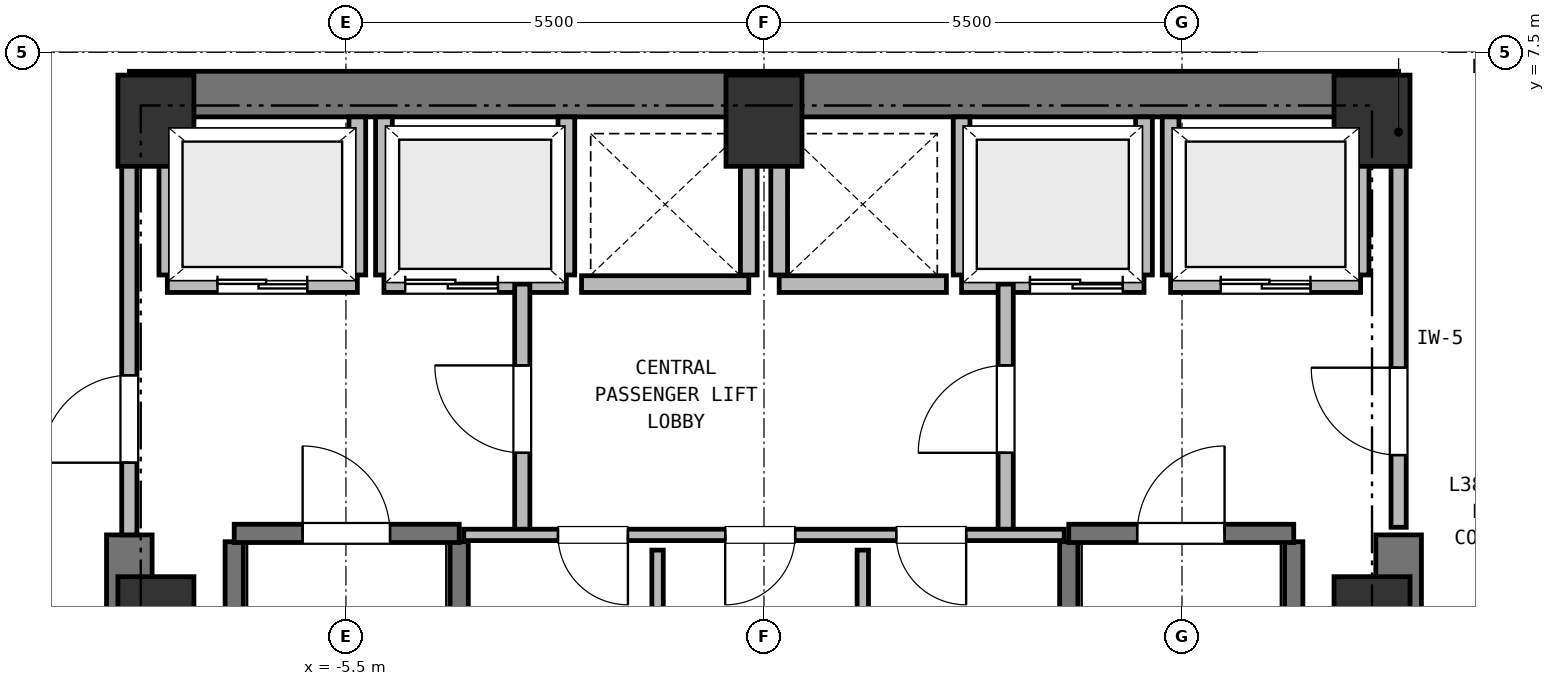
"""IFC4 building model, lengths in metres.
Left out: names, types, materials, properties, quantities, classifications, styles, units other than length and angle.
Written with IfcOpenShell. Run it as: python <this file> out.ifc"""

import sys

from ifc_helpers import new_model, si_unit, direction, frame, frame_2d, origin, origin_2d, place, context, subcontext, project, spatial, rectangle, extrude, element, fill, save


model = new_model("IFC4")
c1 = context("Model", 3, precision=1e-05, world=origin(), true_north=direction((0.0, 1.0)))
c2 = subcontext(c1, "Body", "Model", "MODEL_VIEW")
j1 = project(units=[si_unit("LENGTHUNIT", "METRE"), si_unit("PLANEANGLEUNIT", "RADIAN")], contexts=[c1])
p1 = place(None, origin())
s1 = spatial("IfcSite", under=j1, at=p1, CompositionType="ELEMENT")
p2 = place(p1, origin())
s2 = spatial("IfcBuilding", under=s1, at=p2, CompositionType="ELEMENT")
p3 = place(p2, frame((0.0, 0.0, 153.5)))
s3 = spatial("IfcBuildingStorey", under=s2, at=p3, CompositionType="ELEMENT", Elevation=153.5)
for number, where, z_axis, x_axis in (
    (1, (8.0, 0.0, 0.0), (0.0, 0.0, 1.0), (1.0, 0.0, 0.0)),
    (2, (8.0, 6.6, 0.0), (0.0, 0.0, 1.0), (1.0, 0.0, 0.0)),
    (3, (0.0, 6.6, 0.0), (0.0, 0.0, 1.0), (1.0, 0.0, 0.0)),
    (4, (-8.0, 6.6, 0.0), (0.0, 0.0, 1.0), (1.0, 0.0, 0.0)),
    (5, (-8.0, 0.0, 0.0), (0.0, 0.0, 1.0), (1.0, 0.0, 0.0)),
):
    element("IfcColumn", number, at=place(p3, frame(where, z_axis=z_axis, x_axis=x_axis)), inside=s3, PredefinedType="COLUMN", context=c2, shape_type="SweptSolid", body=[
        extrude(rectangle(XDim=1.0, YDim=1.2, at=origin_2d()), origin(), (0.0, 0.0, 1.0), 3.75),
    ])
p4 = place(p3, frame((-8.35, 6.95, 0.0), z_axis=(0.0, 0.0, 1.0), x_axis=(1.0, 0.0, 0.0)))
e6 = element("IfcWall", 6, at=p4, inside=s3, PredefinedType="SHEAR", context=c2, shape_type="SweptSolid", body=[
    extrude(rectangle(XDim=16.7, YDim=0.6, at=frame_2d((8.35, 0.0))), origin(), (0.0, 0.0, 1.0), 3.5),
])
for number, where, z_axis, x_axis in (
    (7, (-8.35, -6.95, 0.0), (0.0, 0.0, 1.0), (0.0, 1.0, 0.0)),
    (8, (8.35, -6.95, 0.0), (0.0, 0.0, 1.0), (0.0, 1.0, 0.0)),
):
    element("IfcWall", number, at=place(p3, frame(where, z_axis=z_axis, x_axis=x_axis)), inside=s3, PredefinedType="SHEAR", context=c2, shape_type="SweptSolid", body=[
        extrude(rectangle(XDim=8.1, YDim=0.6, at=frame_2d((4.05, 0.0))), origin(), (0.0, 0.0, 1.0), 3.5),
    ])
for number, where, z_axis, x_axis in (
    (9, (-6.97, -6.16, 0.0), (0.0, 0.0, 1.0), (0.0, 1.0, 0.0)),
    (10, (-4.01, -6.16, 0.0), (0.0, 0.0, 1.0), (0.0, 1.0, 0.0)),
):
    element("IfcWall", number, at=place(p3, frame(where, z_axis=z_axis, x_axis=x_axis)), inside=s3, PredefinedType="SHEAR", context=c2, shape_type="SweptSolid", body=[
        extrude(rectangle(XDim=7.22, YDim=0.24, at=frame_2d((3.61, 0.0))), origin(), (0.0, 0.0, 1.0), 3.5),
    ])
p5 = place(p3, frame((-6.97, 1.17, 0.0), z_axis=(0.0, 0.0, 1.0), x_axis=(1.0, 0.0, 0.0)))
e11 = element("IfcWall", 11, at=p5, inside=s3, PredefinedType="SHEAR", context=c2, shape_type="SweptSolid", body=[
    extrude(rectangle(XDim=2.96, YDim=0.24, at=frame_2d((1.48, 0.0))), origin(), (0.0, 0.0, 1.0), 3.5),
])
p6 = place(p5, frame((0.9, 0.0, 0.0)))
e12 = element("IfcOpeningElement", 12, at=p6, cuts=e11, PredefinedType="OPENING", context=c2, shape_type="SweptSolid", body=[
    extrude(rectangle(XDim=1.15, YDim=2.15, at=frame_2d((0.575, 1.075))), frame((0.0, 0.13, 0.0), z_axis=(0.0, -1.0, 0.0), x_axis=(1.0, 0.0, 0.0)), (0.0, 0.0, 1.0), 0.26),
])
for number, where, z_axis, x_axis in (
    (13, (4.01, -6.16, 0.0), (0.0, 0.0, 1.0), (0.0, 1.0, 0.0)),
    (14, (6.97, -6.16, 0.0), (0.0, 0.0, 1.0), (0.0, 1.0, 0.0)),
):
    element("IfcWall", number, at=place(p3, frame(where, z_axis=z_axis, x_axis=x_axis)), inside=s3, PredefinedType="SHEAR", context=c2, shape_type="SweptSolid", body=[
        extrude(rectangle(XDim=7.22, YDim=0.24, at=frame_2d((3.61, 0.0))), origin(), (0.0, 0.0, 1.0), 3.5),
    ])
p7 = place(p3, frame((4.01, 1.17, 0.0), z_axis=(0.0, 0.0, 1.0), x_axis=(1.0, 0.0, 0.0)))
e15 = element("IfcWall", 15, at=p7, inside=s3, PredefinedType="SHEAR", context=c2, shape_type="SweptSolid", body=[
    extrude(rectangle(XDim=2.96, YDim=0.24, at=frame_2d((1.48, 0.0))), origin(), (0.0, 0.0, 1.0), 3.5),
])
p8 = place(p7, frame((0.9, 0.0, 0.0)))
e16 = element("IfcOpeningElement", 16, at=p8, cuts=e15, PredefinedType="OPENING", context=c2, shape_type="SweptSolid", body=[
    extrude(rectangle(XDim=1.15, YDim=2.15, at=frame_2d((0.575, 1.075))), frame((0.0, 0.13, 0.0), z_axis=(0.0, -1.0, 0.0), x_axis=(1.0, 0.0, 0.0)), (0.0, 0.0, 1.0), 0.26),
])
p9 = place(p3, frame((-7.85, 4.45, 0.0), z_axis=(0.0, 0.0, 1.0), x_axis=(1.0, 0.0, 0.0)))
e17 = element("IfcWall", 17, at=p9, inside=s3, PredefinedType="PARTITIONING", context=c2, shape_type="SweptSolid", body=[
    extrude(rectangle(XDim=2.5, YDim=0.22, at=frame_2d((1.25, 0.0))), origin(), (0.0, 0.0, 1.0), 3.5),
])
p10 = place(p9, frame((0.66, 0.0, 0.0)))
e18 = element("IfcOpeningElement", 18, at=p10, cuts=e17, PredefinedType="OPENING", context=c2, shape_type="SweptSolid", body=[
    extrude(rectangle(XDim=1.18, YDim=2.15, at=frame_2d((0.59, 1.075))), frame((0.0, 0.12, 0.0), z_axis=(0.0, -1.0, 0.0), x_axis=(1.0, 0.0, 0.0)), (0.0, 0.0, 1.0), 0.24),
])
p11 = place(p3, frame((-7.85, 4.57, 0.0), z_axis=(0.0, 0.0, 1.0), x_axis=(0.0, 1.0, 0.0)))
e19 = element("IfcWall", 19, at=p11, inside=s3, PredefinedType="PARTITIONING", context=c2, shape_type="SweptSolid", body=[
    extrude(rectangle(XDim=2.08, YDim=0.22, at=frame_2d((1.04, 0.0))), origin(), (0.0, 0.0, 1.0), 3.12),
])
p12 = place(p3, frame((-5.35, 4.57, 0.0), z_axis=(0.0, 0.0, 1.0), x_axis=(0.0, 1.0, 0.0)))
e20 = element("IfcWall", 20, at=p12, inside=s3, PredefinedType="PARTITIONING", context=c2, shape_type="SweptSolid", body=[
    extrude(rectangle(XDim=2.08, YDim=0.22, at=frame_2d((1.04, 0.0))), origin(), (0.0, 0.0, 1.0), 3.5),
])
p13 = place(p3, frame((5.35, 4.45, 0.0), z_axis=(0.0, 0.0, 1.0), x_axis=(1.0, 0.0, 0.0)))
e21 = element("IfcWall", 21, at=p13, inside=s3, PredefinedType="PARTITIONING", context=c2, shape_type="SweptSolid", body=[
    extrude(rectangle(XDim=2.5, YDim=0.22, at=frame_2d((1.25, 0.0))), origin(), (0.0, 0.0, 1.0), 3.5),
])
p14 = place(p13, frame((0.66, 0.0, 0.0)))
e22 = element("IfcOpeningElement", 22, at=p14, cuts=e21, PredefinedType="OPENING", context=c2, shape_type="SweptSolid", body=[
    extrude(rectangle(XDim=1.18, YDim=2.15, at=frame_2d((0.59, 1.075))), frame((0.0, 0.12, 0.0), z_axis=(0.0, -1.0, 0.0), x_axis=(1.0, 0.0, 0.0)), (0.0, 0.0, 1.0), 0.24),
])
p15 = place(p3, frame((5.35, 4.57, 0.0), z_axis=(0.0, 0.0, 1.0), x_axis=(0.0, 1.0, 0.0)))
e23 = element("IfcWall", 23, at=p15, inside=s3, PredefinedType="PARTITIONING", context=c2, shape_type="SweptSolid", body=[
    extrude(rectangle(XDim=2.08, YDim=0.22, at=frame_2d((1.04, 0.0))), origin(), (0.0, 0.0, 1.0), 3.5),
])
p16 = place(p3, frame((7.85, 4.57, 0.0), z_axis=(0.0, 0.0, 1.0), x_axis=(0.0, 1.0, 0.0)))
e24 = element("IfcWall", 24, at=p16, inside=s3, PredefinedType="PARTITIONING", context=c2, shape_type="SweptSolid", body=[
    extrude(rectangle(XDim=2.08, YDim=0.22, at=frame_2d((1.04, 0.0))), origin(), (0.0, 0.0, 1.0), 3.12),
])
p17 = place(p3, frame((-5.0, 4.45, 0.0), z_axis=(0.0, 0.0, 1.0), x_axis=(1.0, 0.0, 0.0)))
e25 = element("IfcWall", 25, at=p17, inside=s3, PredefinedType="PARTITIONING", context=c2, shape_type="SweptSolid", body=[
    extrude(rectangle(XDim=2.4, YDim=0.22, at=frame_2d((1.2, 0.0))), origin(), (0.0, 0.0, 1.0), 3.5),
])
p18 = place(p17, frame((0.28, 0.0, 0.0)))
e26 = element("IfcOpeningElement", 26, at=p18, cuts=e25, PredefinedType="OPENING", context=c2, shape_type="SweptSolid", body=[
    extrude(rectangle(XDim=1.22, YDim=2.15, at=frame_2d((0.61, 1.075))), frame((0.0, 0.12, 0.0), z_axis=(0.0, -1.0, 0.0), x_axis=(1.0, 0.0, 0.0)), (0.0, 0.0, 1.0), 0.24),
])
for number, where, z_axis, x_axis in (
    (27, (-5.0, 4.57, 0.0), (0.0, 0.0, 1.0), (0.0, 1.0, 0.0)),
    (28, (-2.6, 4.57, 0.0), (0.0, 0.0, 1.0), (0.0, 1.0, 0.0)),
):
    element("IfcWall", number, at=place(p3, frame(where, z_axis=z_axis, x_axis=x_axis)), inside=s3, PredefinedType="PARTITIONING", context=c2, shape_type="SweptSolid", body=[
        extrude(rectangle(XDim=2.08, YDim=0.22, at=frame_2d((1.04, 0.0))), origin(), (0.0, 0.0, 1.0), 3.5),
    ])
p19 = place(p3, frame((2.6, 4.45, 0.0), z_axis=(0.0, 0.0, 1.0), x_axis=(1.0, 0.0, 0.0)))
e29 = element("IfcWall", 29, at=p19, inside=s3, PredefinedType="PARTITIONING", context=c2, shape_type="SweptSolid", body=[
    extrude(rectangle(XDim=2.4, YDim=0.22, at=frame_2d((1.2, 0.0))), origin(), (0.0, 0.0, 1.0), 3.5),
])
p20 = place(p19, frame((0.9, 0.0, 0.0)))
e30 = element("IfcOpeningElement", 30, at=p20, cuts=e29, PredefinedType="OPENING", context=c2, shape_type="SweptSolid", body=[
    extrude(rectangle(XDim=1.22, YDim=2.15, at=frame_2d((0.61, 1.075))), frame((0.0, 0.12, 0.0), z_axis=(0.0, -1.0, 0.0), x_axis=(1.0, 0.0, 0.0)), (0.0, 0.0, 1.0), 0.24),
])
for number, where, z_axis, x_axis in (
    (31, (2.6, 4.57, 0.0), (0.0, 0.0, 1.0), (0.0, 1.0, 0.0)),
    (32, (5.0, 4.57, 0.0), (0.0, 0.0, 1.0), (0.0, 1.0, 0.0)),
):
    element("IfcWall", number, at=place(p3, frame(where, z_axis=z_axis, x_axis=x_axis)), inside=s3, PredefinedType="PARTITIONING", context=c2, shape_type="SweptSolid", body=[
        extrude(rectangle(XDim=2.08, YDim=0.22, at=frame_2d((1.04, 0.0))), origin(), (0.0, 0.0, 1.0), 3.5),
    ])
p21 = place(p3, frame((-2.4, 4.45, 0.0), z_axis=(0.0, 0.0, 1.0), x_axis=(1.0, 0.0, 0.0)))
e33 = element("IfcWall", 33, at=p21, inside=s3, PredefinedType="PARTITIONING", context=c2, shape_type="SweptSolid", body=[
    extrude(rectangle(XDim=2.2, YDim=0.22, at=frame_2d((1.1, 0.0))), origin(), (0.0, 0.0, 1.0), 3.5),
])
p22 = place(p3, frame((-0.2, 4.57, 0.0), z_axis=(0.0, 0.0, 1.0), x_axis=(0.0, 1.0, 0.0)))
e34 = element("IfcWall", 34, at=p22, inside=s3, PredefinedType="PARTITIONING", context=c2, shape_type="SweptSolid", body=[
    extrude(rectangle(XDim=2.08, YDim=0.22, at=frame_2d((1.04, 0.0))), origin(), (0.0, 0.0, 1.0), 3.5),
])
p23 = place(p3, frame((0.2, 4.45, 0.0), z_axis=(0.0, 0.0, 1.0), x_axis=(1.0, 0.0, 0.0)))
e35 = element("IfcWall", 35, at=p23, inside=s3, PredefinedType="PARTITIONING", context=c2, shape_type="SweptSolid", body=[
    extrude(rectangle(XDim=2.2, YDim=0.22, at=frame_2d((1.1, 0.0))), origin(), (0.0, 0.0, 1.0), 3.5),
])
p24 = place(p3, frame((0.2, 4.57, 0.0), z_axis=(0.0, 0.0, 1.0), x_axis=(0.0, 1.0, 0.0)))
e36 = element("IfcWall", 36, at=p24, inside=s3, PredefinedType="PARTITIONING", context=c2, shape_type="SweptSolid", body=[
    extrude(rectangle(XDim=2.08, YDim=0.22, at=frame_2d((1.04, 0.0))), origin(), (0.0, 0.0, 1.0), 3.5),
])
p25 = place(p3, frame((-3.18, 1.15, 0.0), z_axis=(0.0, 0.0, 1.0), x_axis=(0.0, 1.0, 0.0)))
e37 = element("IfcWall", 37, at=p25, inside=s3, PredefinedType="PARTITIONING", context=c2, shape_type="SweptSolid", body=[
    extrude(rectangle(XDim=3.3, YDim=0.2, at=frame_2d((1.65, 0.0))), origin(), (0.0, 0.0, 1.0), 3.5),
])
p26 = place(p25, frame((1.08, 0.0, 0.0)))
e38 = element("IfcOpeningElement", 38, at=p26, cuts=e37, PredefinedType="OPENING", context=c2, shape_type="SweptSolid", body=[
    extrude(rectangle(XDim=1.15, YDim=2.15, at=frame_2d((0.575, 1.075))), frame((0.0, 0.11, 0.0), z_axis=(0.0, -1.0, 0.0), x_axis=(1.0, 0.0, 0.0)), (0.0, 0.0, 1.0), 0.22),
])
p27 = place(p3, frame((3.18, 1.15, 0.0), z_axis=(0.0, 0.0, 1.0), x_axis=(0.0, 1.0, 0.0)))
e39 = element("IfcWall", 39, at=p27, inside=s3, PredefinedType="PARTITIONING", context=c2, shape_type="SweptSolid", body=[
    extrude(rectangle(XDim=3.3, YDim=0.2, at=frame_2d((1.65, 0.0))), origin(), (0.0, 0.0, 1.0), 3.5),
])
p28 = place(p27, frame((1.08, 0.0, 0.0)))
e40 = element("IfcOpeningElement", 40, at=p28, cuts=e39, PredefinedType="OPENING", context=c2, shape_type="SweptSolid", body=[
    extrude(rectangle(XDim=1.15, YDim=2.15, at=frame_2d((0.575, 1.075))), frame((0.0, 0.11, 0.0), z_axis=(0.0, -1.0, 0.0), x_axis=(1.0, 0.0, 0.0)), (0.0, 0.0, 1.0), 0.22),
])
p29 = place(p3, frame((-8.35, 1.15, 0.0), z_axis=(0.0, 0.0, 1.0), x_axis=(0.0, 1.0, 0.0)))
e41 = element("IfcWall", 41, at=p29, inside=s3, PredefinedType="PARTITIONING", context=c2, shape_type="SweptSolid", body=[
    extrude(rectangle(XDim=5.4, YDim=0.2, at=frame_2d((2.7, 0.0))), origin(), (0.0, 0.0, 1.0), 3.5),
])
p30 = place(p29, frame((0.95, 0.0, 0.0)))
e42 = element("IfcOpeningElement", 42, at=p30, cuts=e41, PredefinedType="OPENING", context=c2, shape_type="SweptSolid", body=[
    extrude(rectangle(XDim=1.15, YDim=2.15, at=frame_2d((0.575, 1.075))), frame((0.0, 0.11, 0.0), z_axis=(0.0, -1.0, 0.0), x_axis=(1.0, 0.0, 0.0)), (0.0, 0.0, 1.0), 0.22),
])
p31 = place(p3, frame((8.35, 1.25, 0.0), z_axis=(0.0, 0.0, 1.0), x_axis=(0.0, 1.0, 0.0)))
e43 = element("IfcWall", 43, at=p31, inside=s3, PredefinedType="PARTITIONING", context=c2, shape_type="SweptSolid", body=[
    extrude(rectangle(XDim=5.3, YDim=0.2, at=frame_2d((2.65, 0.0))), origin(), (0.0, 0.0, 1.0), 3.5),
])
p32 = place(p31, frame((0.95, 0.0, 0.0)))
e44 = element("IfcOpeningElement", 44, at=p32, cuts=e43, PredefinedType="OPENING", context=c2, shape_type="SweptSolid", body=[
    extrude(rectangle(XDim=1.15, YDim=2.15, at=frame_2d((0.575, 1.075))), frame((0.0, 0.11, 0.0), z_axis=(0.0, -1.0, 0.0), x_axis=(1.0, 0.0, 0.0)), (0.0, 0.0, 1.0), 0.22),
])
p33 = place(p3, frame((3.95, 1.15, 0.0), z_axis=(0.0, 0.0, 1.0), x_axis=(-1.0, 0.0, 0.0)))
e45 = element("IfcWall", 45, at=p33, inside=s3, PredefinedType="PARTITIONING", context=c2, shape_type="SweptSolid", body=[
    extrude(rectangle(XDim=7.9, YDim=0.15, at=frame_2d((3.95, 0.0))), origin(), (0.0, 0.0, 1.0), 3.5),
])
p34 = place(p33, frame((5.74, 0.0, 0.0)))
e46 = element("IfcOpeningElement", 46, at=p34, cuts=e45, PredefinedType="OPENING", context=c2, shape_type="SweptSolid", body=[
    extrude(rectangle(XDim=0.92, YDim=2.05, at=frame_2d((0.46, 1.025))), frame((0.0, 0.085, 0.0), z_axis=(0.0, -1.0, 0.0), x_axis=(1.0, 0.0, 0.0)), (0.0, 0.0, 1.0), 0.17),
])
p35 = place(p33, frame((3.54, 0.0, 0.0)))
e47 = element("IfcOpeningElement", 47, at=p35, cuts=e45, PredefinedType="OPENING", context=c2, shape_type="SweptSolid", body=[
    extrude(rectangle(XDim=0.92, YDim=2.05, at=frame_2d((0.46, 1.025))), frame((0.0, 0.085, 0.0), z_axis=(0.0, -1.0, 0.0), x_axis=(1.0, 0.0, 0.0)), (0.0, 0.0, 1.0), 0.17),
])
p36 = place(p33, frame((1.29, 0.0, 0.0)))
e48 = element("IfcOpeningElement", 48, at=p36, cuts=e45, PredefinedType="OPENING", context=c2, shape_type="SweptSolid", body=[
    extrude(rectangle(XDim=0.92, YDim=2.05, at=frame_2d((0.46, 1.025))), frame((0.0, 0.085, 0.0), z_axis=(0.0, -1.0, 0.0), x_axis=(1.0, 0.0, 0.0)), (0.0, 0.0, 1.0), 0.17),
])
p37 = place(p3, frame((-1.4, -6.58, 0.0), z_axis=(0.0, 0.0, 1.0), x_axis=(0.0, 1.0, 0.0)))
e49 = element("IfcWall", 49, at=p37, inside=s3, PredefinedType="PARTITIONING", context=c2, shape_type="SweptSolid", body=[
    extrude(rectangle(XDim=7.53, YDim=0.15, at=frame_2d((3.765, 0.0))), origin(), (0.0, 0.0, 1.0), 3.5),
])
p38 = place(p3, frame((1.3, -4.08, 0.0), z_axis=(0.0, 0.0, 1.0), x_axis=(0.0, 1.0, 0.0)))
e50 = element("IfcWall", 50, at=p38, inside=s3, PredefinedType="PARTITIONING", context=c2, shape_type="SweptSolid", body=[
    extrude(rectangle(XDim=5.03, YDim=0.15, at=frame_2d((2.515, 0.0))), origin(), (0.0, 0.0, 1.0), 3.5),
])
p39 = place(p3, frame((8.678, 9.272, 0.0), z_axis=(0.0, 0.0, 1.0), x_axis=(0.707106781187, -0.707106781187, 0.0)))
e51 = element("IfcWall", 51, at=p39, inside=s3, PredefinedType="PARTITIONING", context=c2, shape_type="SweptSolid", body=[
    extrude(rectangle(XDim=2.89, YDim=0.15, at=frame_2d((1.445, 0.0))), origin(), (0.0, 0.0, 1.0), 3.5),
])
p40 = place(p39, frame((0.955, 0.0, 0.0)))
e52 = element("IfcOpeningElement", 52, at=p40, cuts=e51, PredefinedType="OPENING", context=c2, shape_type="SweptSolid", body=[
    extrude(rectangle(XDim=1.06, YDim=2.15, at=frame_2d((0.53, 1.075))), frame((0.0, 0.085, 0.0), z_axis=(0.0, -1.0, 0.0), x_axis=(1.0, 0.0, 0.0)), (0.0, 0.0, 1.0), 0.17),
])
p41 = place(p3, frame((-10.722, 7.228, 0.0), z_axis=(0.0, 0.0, 1.0), x_axis=(0.707106781187, 0.707106781187, 0.0)))
e53 = element("IfcWall", 53, at=p41, inside=s3, PredefinedType="PARTITIONING", context=c2, shape_type="SweptSolid", body=[
    extrude(rectangle(XDim=2.89, YDim=0.15, at=frame_2d((1.445, 0.0))), origin(), (0.0, 0.0, 1.0), 3.5),
])
p42 = place(p6, origin())
e54 = element("IfcDoor", 54, at=p42, inside=s3, OperationType="SINGLE_SWING_LEFT", PredefinedType="DOOR", context=c2, shape_type="SweptSolid", body=[
    extrude(rectangle(XDim=1.15, YDim=2.15, at=frame_2d((0.575, 1.075))), frame((0.0, 0.025, 0.0), z_axis=(0.0, -1.0, 0.0), x_axis=(1.0, 0.0, 0.0)), (0.0, 0.0, 1.0), 0.05),
])
fill(e12, e54)
p43 = place(p8, origin())
e55 = element("IfcDoor", 55, at=p43, inside=s3, OperationType="SINGLE_SWING_RIGHT", PredefinedType="DOOR", context=c2, shape_type="SweptSolid", body=[
    extrude(rectangle(XDim=1.15, YDim=2.15, at=frame_2d((0.575, 1.075))), frame((0.0, 0.025, 0.0), z_axis=(0.0, -1.0, 0.0), x_axis=(1.0, 0.0, 0.0)), (0.0, 0.0, 1.0), 0.05),
])
fill(e16, e55)
p44 = place(p10, origin())
e56 = element("IfcDoor", 56, at=p44, inside=s3, OperationType="DOUBLE_DOOR_SLIDING", PredefinedType="DOOR", context=c2, shape_type="SweptSolid", body=[
    extrude(rectangle(XDim=1.18, YDim=2.15, at=frame_2d((0.59, 1.075))), frame((0.0, 0.025, 0.0), z_axis=(0.0, -1.0, 0.0), x_axis=(1.0, 0.0, 0.0)), (0.0, 0.0, 1.0), 0.05),
])
fill(e18, e56)
p45 = place(p14, origin())
e57 = element("IfcDoor", 57, at=p45, inside=s3, OperationType="DOUBLE_DOOR_SLIDING", PredefinedType="DOOR", context=c2, shape_type="SweptSolid", body=[
    extrude(rectangle(XDim=1.18, YDim=2.15, at=frame_2d((0.59, 1.075))), frame((0.0, 0.025, 0.0), z_axis=(0.0, -1.0, 0.0), x_axis=(1.0, 0.0, 0.0)), (0.0, 0.0, 1.0), 0.05),
])
fill(e22, e57)
p46 = place(p18, origin())
e58 = element("IfcDoor", 58, at=p46, inside=s3, OperationType="DOUBLE_DOOR_SLIDING", PredefinedType="DOOR", context=c2, shape_type="SweptSolid", body=[
    extrude(rectangle(XDim=1.22, YDim=2.15, at=frame_2d((0.61, 1.075))), frame((0.0, 0.025, 0.0), z_axis=(0.0, -1.0, 0.0), x_axis=(1.0, 0.0, 0.0)), (0.0, 0.0, 1.0), 0.05),
])
fill(e26, e58)
p47 = place(p20, origin())
e59 = element("IfcDoor", 59, at=p47, inside=s3, OperationType="DOUBLE_DOOR_SLIDING", PredefinedType="DOOR", context=c2, shape_type="SweptSolid", body=[
    extrude(rectangle(XDim=1.22, YDim=2.15, at=frame_2d((0.61, 1.075))), frame((0.0, 0.025, 0.0), z_axis=(0.0, -1.0, 0.0), x_axis=(1.0, 0.0, 0.0)), (0.0, 0.0, 1.0), 0.05),
])
fill(e30, e59)
p48 = place(p26, origin())
e60 = element("IfcDoor", 60, at=p48, inside=s3, OperationType="SINGLE_SWING_RIGHT", PredefinedType="DOOR", context=c2, shape_type="SweptSolid", body=[
    extrude(rectangle(XDim=1.15, YDim=2.15, at=frame_2d((0.575, 1.075))), frame((0.0, 0.025, 0.0), z_axis=(0.0, -1.0, 0.0), x_axis=(1.0, 0.0, 0.0)), (0.0, 0.0, 1.0), 0.05),
])
fill(e38, e60)
p49 = place(p28, origin())
e61 = element("IfcDoor", 61, at=p49, inside=s3, OperationType="SINGLE_SWING_LEFT", PredefinedType="DOOR", context=c2, shape_type="SweptSolid", body=[
    extrude(rectangle(XDim=1.15, YDim=2.15, at=frame_2d((0.575, 1.075))), frame((0.0, 0.025, 0.0), z_axis=(0.0, -1.0, 0.0), x_axis=(1.0, 0.0, 0.0)), (0.0, 0.0, 1.0), 0.05),
])
fill(e40, e61)
p50 = place(p30, origin())
e62 = element("IfcDoor", 62, at=p50, inside=s3, OperationType="SINGLE_SWING_LEFT", PredefinedType="DOOR", context=c2, shape_type="SweptSolid", body=[
    extrude(rectangle(XDim=1.15, YDim=2.15, at=frame_2d((0.575, 1.075))), frame((0.0, 0.025, 0.0), z_axis=(0.0, -1.0, 0.0), x_axis=(1.0, 0.0, 0.0)), (0.0, 0.0, 1.0), 0.05),
])
fill(e42, e62)
p51 = place(p32, origin())
e63 = element("IfcDoor", 63, at=p51, inside=s3, OperationType="SINGLE_SWING_RIGHT", PredefinedType="DOOR", context=c2, shape_type="SweptSolid", body=[
    extrude(rectangle(XDim=1.15, YDim=2.15, at=frame_2d((0.575, 1.075))), frame((0.0, 0.025, 0.0), z_axis=(0.0, -1.0, 0.0), x_axis=(1.0, 0.0, 0.0)), (0.0, 0.0, 1.0), 0.05),
])
fill(e44, e63)
p52 = place(p34, origin())
e64 = element("IfcDoor", 64, at=p52, inside=s3, OperationType="SINGLE_SWING_LEFT", PredefinedType="DOOR", context=c2, shape_type="SweptSolid", body=[
    extrude(rectangle(XDim=0.92, YDim=2.05, at=frame_2d((0.46, 1.025))), frame((0.0, 0.025, 0.0), z_axis=(0.0, -1.0, 0.0), x_axis=(1.0, 0.0, 0.0)), (0.0, 0.0, 1.0), 0.05),
])
fill(e46, e64)
p53 = place(p35, origin())
e65 = element("IfcDoor", 65, at=p53, inside=s3, OperationType="SINGLE_SWING_RIGHT", PredefinedType="DOOR", context=c2, shape_type="SweptSolid", body=[
    extrude(rectangle(XDim=0.92, YDim=2.05, at=frame_2d((0.46, 1.025))), frame((0.0, 0.025, 0.0), z_axis=(0.0, -1.0, 0.0), x_axis=(1.0, 0.0, 0.0)), (0.0, 0.0, 1.0), 0.05),
])
fill(e47, e65)
p54 = place(p36, origin())
e66 = element("IfcDoor", 66, at=p54, inside=s3, OperationType="SINGLE_SWING_LEFT", PredefinedType="DOOR", context=c2, shape_type="SweptSolid", body=[
    extrude(rectangle(XDim=0.92, YDim=2.05, at=frame_2d((0.46, 1.025))), frame((0.0, 0.025, 0.0), z_axis=(0.0, -1.0, 0.0), x_axis=(1.0, 0.0, 0.0)), (0.0, 0.0, 1.0), 0.05),
])
fill(e48, e66)
save(model, sys.argv[1])
